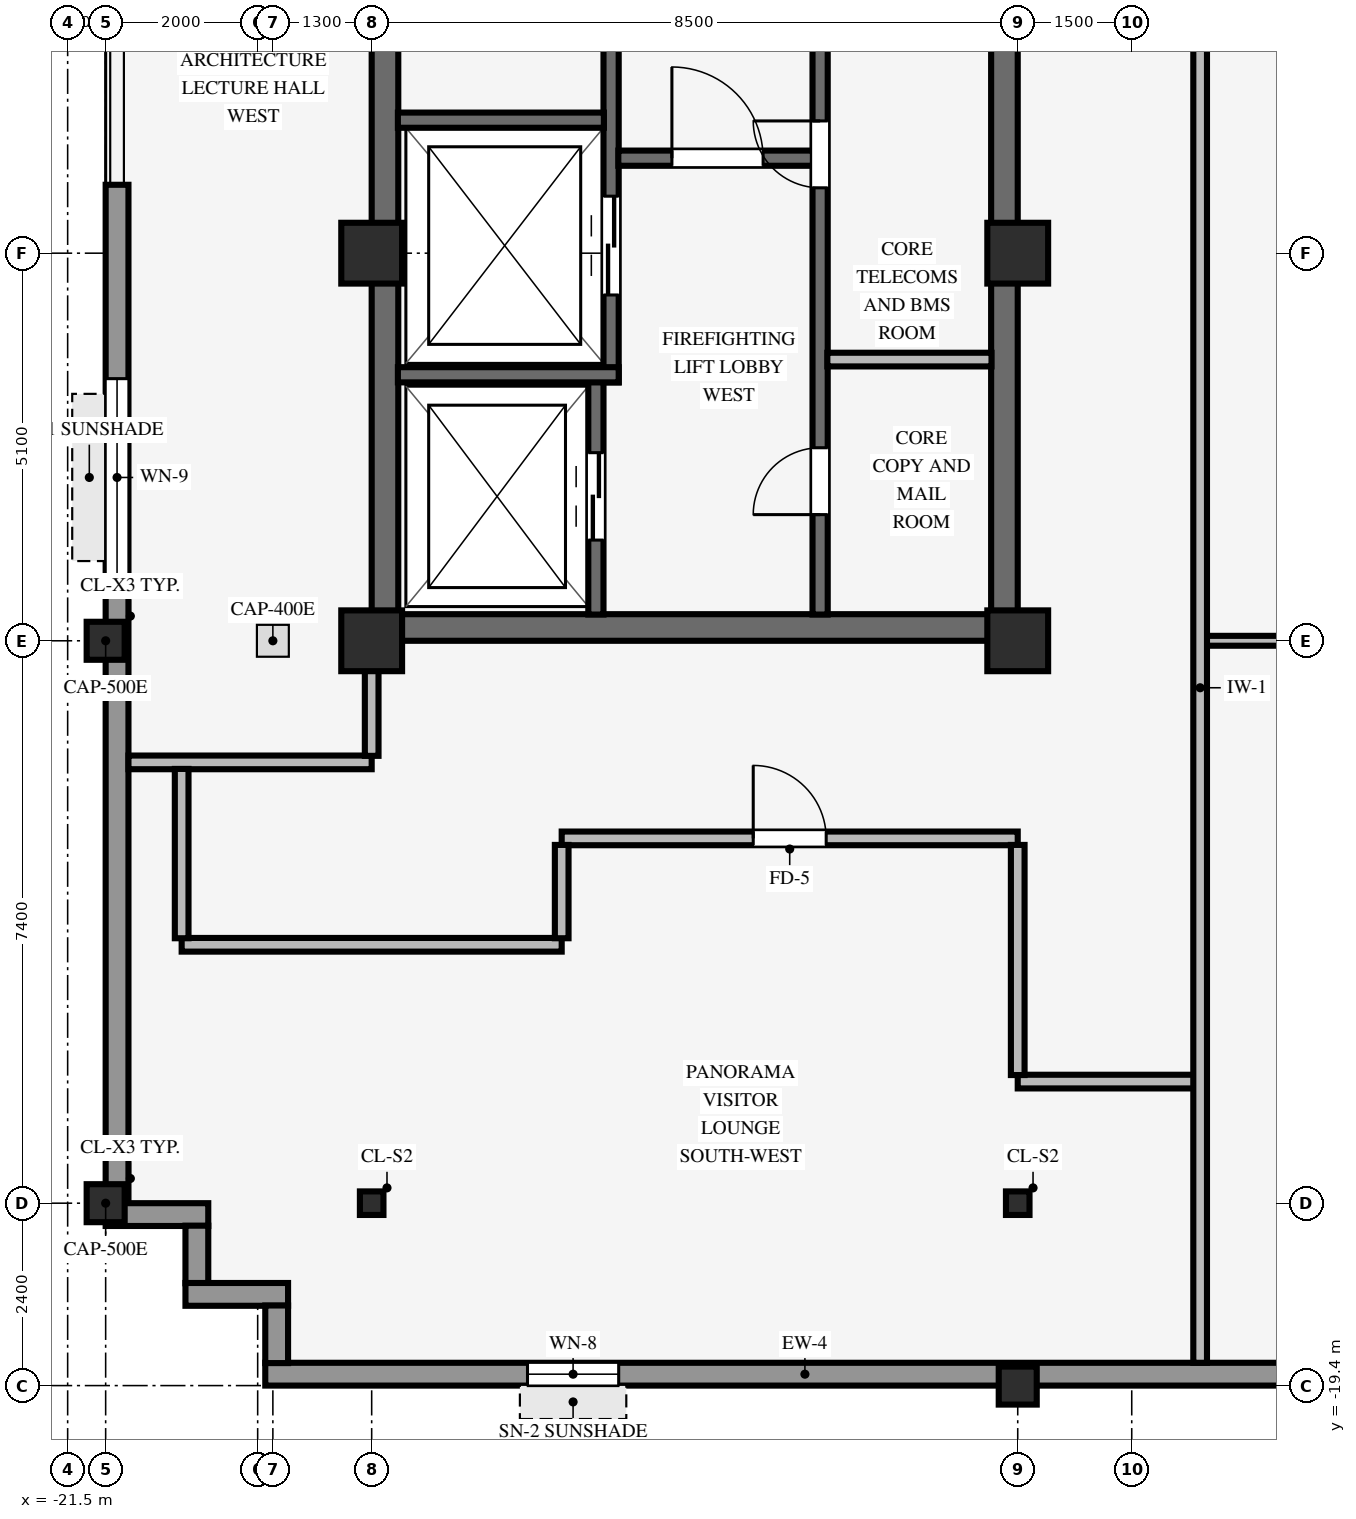
"""IFC4 building model, lengths in metres.
Left out: names, types, materials, properties, quantities, classifications, styles, units other than length and angle.
Written with IfcOpenShell. Run it as: python <this file> out.ifc"""

import sys

from ifc_helpers import new_model, si_unit, direction, frame, frame_2d, origin, origin_2d, place, context, subcontext, project, spatial, rectangle, hollow_rectangle, i_section, extrude, source, transform, mapped, element, fill, save


model = new_model("IFC4")
c1 = context("Model", 3, precision=1e-05, world=origin(), true_north=direction((0.0, 1.0)))
c2 = subcontext(c1, "Body", "Model", "MODEL_VIEW")
j1 = project(units=[si_unit("LENGTHUNIT", "METRE"), si_unit("PLANEANGLEUNIT", "RADIAN")], contexts=[c1])
p1 = place(None, origin())
s1 = spatial("IfcSite", under=j1, at=p1, CompositionType="ELEMENT")
p2 = place(p1, origin())
s2 = spatial("IfcBuilding", under=s1, at=p2, CompositionType="ELEMENT")
p3 = place(p2, frame((0.0, 0.0, 283.5)))
s3 = spatial("IfcBuildingStorey", under=s2, at=p3, CompositionType="ELEMENT", Elevation=283.5)
p4 = place(p3, frame((-17.5, -9.425, 0.0), z_axis=(0.0, 0.0, 1.0), x_axis=(1.0, 0.0, 0.0)))
e1 = element("IfcWall", 1, at=p4, inside=s3, PredefinedType="SHEAR", context=c2, shape_type="SweptSolid", body=[
    extrude(rectangle(XDim=8.5, YDim=0.35, at=frame_2d((4.25, 0.0))), origin(), (0.0, 0.0, 1.0), 3.25),
])
p5 = place(p3, frame((-17.325, -9.255, 0.0), z_axis=(0.0, 0.0, 1.0), x_axis=(0.0, 1.0, 0.0)))
e2 = element("IfcWall", 2, at=p5, inside=s3, PredefinedType="SHEAR", context=c2, shape_type="SweptSolid", body=[
    extrude(rectangle(XDim=18.51, YDim=0.35, at=frame_2d((9.255, 0.0))), origin(), (0.0, 0.0, 1.0), 3.25),
])
p6 = place(p3, frame((-9.175, -9.255, 0.0), z_axis=(0.0, 0.0, 1.0), x_axis=(0.0, 1.0, 0.0)))
e3 = element("IfcWall", 3, at=p6, inside=s3, PredefinedType="SHEAR", context=c2, shape_type="SweptSolid", body=[
    extrude(rectangle(XDim=18.51, YDim=0.35, at=frame_2d((9.255, 0.0))), origin(), (0.0, 0.0, 1.0), 3.25),
])
p7 = place(p6, frame((8.655, 0.0, 0.0)))
e4 = element("IfcOpeningElement", 4, at=p7, cuts=e3, PredefinedType="OPENING", context=c2, shape_type="SweptSolid", body=[
    extrude(rectangle(XDim=1.2, YDim=2.15, at=frame_2d((0.6, 1.075))), frame((0.0, 0.185, 0.0), z_axis=(0.0, -1.0, 0.0), x_axis=(1.0, 0.0, 0.0)), (0.0, 0.0, 1.0), 0.37),
])
for number, where, z_axis, x_axis in (
    (5, (-17.5, -9.6, 0.0), (0.0, 0.0, 1.0), (1.0, 0.0, 0.0)),
    (6, (-17.5, -4.5, 0.0), (0.0, 0.0, 1.0), (1.0, 0.0, 0.0)),
    (7, (-9.0, -9.6, 0.0), (0.0, 0.0, 1.0), (1.0, 0.0, 0.0)),
    (8, (-9.0, -4.5, 0.0), (0.0, 0.0, 1.0), (1.0, 0.0, 0.0)),
):
    element("IfcColumn", number, at=place(p3, frame(where, z_axis=z_axis, x_axis=x_axis)), inside=s3, PredefinedType="COLUMN", context=c2, shape_type="SweptSolid", body=[
        extrude(rectangle(XDim=0.8, YDim=0.8, at=origin_2d()), origin(), (0.0, 0.0, 1.0), 3.25),
    ])
for number, where, z_axis, x_axis in (
    (9, (-21.0, -17.0, 0.0), (0.0, 0.0, 1.0), (1.0, 0.0, 0.0)),
    (10, (-21.0, -9.6, 0.0), (0.0, 0.0, 1.0), (1.0, 0.0, 0.0)),
    (11, (-9.0, -19.4, 0.0), (0.0, 0.0, 1.0), (1.0, 0.0, 0.0)),
):
    element("IfcColumn", number, at=place(p3, frame(where, z_axis=z_axis, x_axis=x_axis)), inside=s3, PredefinedType="COLUMN", context=c2, shape_type="SweptSolid", body=[
        extrude(hollow_rectangle(XDim=0.5, YDim=0.5, WallThickness=0.032, InnerFilletRadius=0.032, OuterFilletRadius=0.064, at=origin_2d()), origin(), (0.0, 0.0, 1.0), 3.25),
    ])
for number, where, z_axis, x_axis in (
    (12, (-17.5, -17.0, 0.0), (0.0, 0.0, 1.0), (1.0, 0.0, 0.0)),
    (13, (-9.0, -17.0, 0.0), (0.0, 0.0, 1.0), (1.0, 0.0, 0.0)),
):
    element("IfcColumn", number, at=place(p3, frame(where, z_axis=z_axis, x_axis=x_axis)), inside=s3, PredefinedType="COLUMN", context=c2, shape_type="SweptSolid", body=[
        extrude(i_section(OverallWidth=0.31, OverallDepth=0.31, WebThickness=0.015, FlangeThickness=0.015, FilletRadius=0.015, at=origin_2d()), origin(), (0.0, 0.0, 1.0), 3.25),
    ])
p8 = place(p3, frame((-18.9, -19.25, 0.0), z_axis=(0.0, 0.0, 1.0), x_axis=(1.0, 0.0, 0.0)))
e14 = element("IfcWall", 14, at=p8, inside=s3, PredefinedType="STANDARD", context=c2, shape_type="SweptSolid", body=[
    extrude(rectangle(XDim=14.2, YDim=0.3, at=frame_2d((7.1, 0.0))), origin(), (0.0, 0.0, 1.0), 3.24),
])
p9 = place(p8, frame((3.45, 0.0, 0.8)))
e15 = element("IfcOpeningElement", 15, at=p9, cuts=e14, PredefinedType="OPENING", context=c2, shape_type="SweptSolid", body=[
    extrude(rectangle(XDim=1.2, YDim=1.48, at=frame_2d((0.6, 0.74))), frame((0.0, 0.16, 0.0), z_axis=(0.0, -1.0, 0.0), x_axis=(1.0, 0.0, 0.0)), (0.0, 0.0, 1.0), 0.32),
])
p10 = place(p3, frame((-20.85, -17.004, 0.0), z_axis=(0.0, 0.0, 1.0), x_axis=(0.0, 1.0, 0.0)))
e16 = element("IfcWall", 16, at=p10, inside=s3, PredefinedType="STANDARD", context=c2, shape_type="SweptSolid", body=[
    extrude(rectangle(XDim=13.404, YDim=0.3, at=frame_2d((6.702, 0.0))), origin(), (0.0, 0.0, 1.0), 3.24),
])
p11 = place(p10, frame((8.253, 0.0, 0.8)))
e17 = element("IfcOpeningElement", 17, at=p11, cuts=e16, PredefinedType="OPENING", context=c2, shape_type="SweptSolid", body=[
    extrude(rectangle(XDim=2.6, YDim=1.9, at=frame_2d((1.3, 0.95))), frame((0.0, 0.16, 0.0), z_axis=(0.0, -1.0, 0.0), x_axis=(1.0, 0.0, 0.0)), (0.0, 0.0, 1.0), 0.32),
])
p12 = place(p3, frame((-21.0, -17.15, 0.0), z_axis=(0.0, 0.0, 1.0), x_axis=(1.0, 0.0, 0.0)))
e18 = element("IfcWall", 18, at=p12, inside=s3, PredefinedType="STANDARD", context=c2, shape_type="SweptSolid", body=[
    extrude(rectangle(XDim=1.35, YDim=0.3, at=frame_2d((0.675, 0.0))), origin(), (0.0, 0.0, 1.0), 3.24),
])
p13 = place(p3, frame((-19.8, -18.054, 0.0), z_axis=(0.0, 0.0, 1.0), x_axis=(0.0, 1.0, 0.0)))
e19 = element("IfcWall", 19, at=p13, inside=s3, PredefinedType="STANDARD", context=c2, shape_type="SweptSolid", body=[
    extrude(rectangle(XDim=0.758, YDim=0.3, at=frame_2d((0.379, 0.0))), origin(), (0.0, 0.0, 1.0), 3.24),
])
p14 = place(p3, frame((-19.95, -18.2, 0.0), z_axis=(0.0, 0.0, 1.0), x_axis=(1.0, 0.0, 0.0)))
e20 = element("IfcWall", 20, at=p14, inside=s3, PredefinedType="STANDARD", context=c2, shape_type="SweptSolid", body=[
    extrude(rectangle(XDim=1.35, YDim=0.3, at=frame_2d((0.675, 0.0))), origin(), (0.0, 0.0, 1.0), 3.24),
])
p15 = place(p3, frame((-18.75, -19.104, 0.0), z_axis=(0.0, 0.0, 1.0), x_axis=(0.0, 1.0, 0.0)))
e21 = element("IfcWall", 21, at=p15, inside=s3, PredefinedType="STANDARD", context=c2, shape_type="SweptSolid", body=[
    extrude(rectangle(XDim=0.758, YDim=0.3, at=frame_2d((0.379, 0.0))), origin(), (0.0, 0.0, 1.0), 3.24),
])
p16 = place(p3, frame((-14.55, -9.255, 0.0), z_axis=(0.0, 0.0, 1.0), x_axis=(0.0, 1.0, 0.0)))
e22 = element("IfcWall", 22, at=p16, inside=s3, PredefinedType="SHEAR", context=c2, shape_type="SweptSolid", body=[
    extrude(rectangle(XDim=3.06, YDim=0.2, at=frame_2d((1.53, 0.0))), origin(), (0.0, 0.0, 1.0), 3.25),
])
p17 = place(p16, frame((0.98, 0.0, 0.0)))
e23 = element("IfcOpeningElement", 23, at=p17, cuts=e22, PredefinedType="OPENING", context=c2, shape_type="SweptSolid", body=[
    extrude(rectangle(XDim=1.15, YDim=2.15, at=frame_2d((0.575, 1.075))), frame((0.0, 0.11, 0.0), z_axis=(0.0, -1.0, 0.0), x_axis=(1.0, 0.0, 0.0)), (0.0, 0.0, 1.0), 0.22),
])
p18 = place(p3, frame((-14.35, -6.2, 0.0), z_axis=(0.0, 0.0, 1.0), x_axis=(0.0, 1.0, 0.0)))
e24 = element("IfcWall", 24, at=p18, inside=s3, PredefinedType="SHEAR", context=c2, shape_type="SweptSolid", body=[
    extrude(rectangle(XDim=7.105, YDim=0.2, at=frame_2d((3.552, 0.0))), origin(), (0.0, 0.0, 1.0), 3.25),
])
p19 = place(p18, frame((5.69, 0.0, 0.0), z_axis=(0.0, 0.0, 1.0), x_axis=(-1.0, 0.0, 0.0)))
e25 = element("IfcOpeningElement", 25, at=p19, cuts=e24, PredefinedType="OPENING", context=c2, shape_type="SweptSolid", body=[
    extrude(rectangle(XDim=0.88, YDim=2.1, at=frame_2d((0.44, 1.05))), frame((0.0, 0.11, 0.0), z_axis=(0.0, -1.0, 0.0), x_axis=(1.0, 0.0, 0.0)), (0.0, 0.0, 1.0), 0.22),
])
p20 = place(p18, frame((1.15, 0.0, 0.0)))
e26 = element("IfcOpeningElement", 26, at=p20, cuts=e24, PredefinedType="OPENING", context=c2, shape_type="SweptSolid", body=[
    extrude(rectangle(XDim=1.3, YDim=2.2, at=frame_2d((0.65, 1.1))), frame((0.0, 0.11, 0.0), z_axis=(0.0, -1.0, 0.0), x_axis=(1.0, 0.0, 0.0)), (0.0, 0.0, 1.0), 0.22),
])
p21 = place(p3, frame((-17.155, -6.1, 0.0), z_axis=(0.0, 0.0, 1.0), x_axis=(1.0, 0.0, 0.0)))
e27 = element("IfcWall", 27, at=p21, inside=s3, PredefinedType="SHEAR", context=c2, shape_type="SweptSolid", body=[
    extrude(rectangle(XDim=2.905, YDim=0.2, at=frame_2d((1.453, 0.0))), origin(), (0.0, 0.0, 1.0), 3.25),
])
p22 = place(p3, frame((-17.155, -2.75, 0.0), z_axis=(0.0, 0.0, 1.0), x_axis=(1.0, 0.0, 0.0)))
e28 = element("IfcWall", 28, at=p22, inside=s3, PredefinedType="SHEAR", context=c2, shape_type="SweptSolid", body=[
    extrude(rectangle(XDim=2.71, YDim=0.2, at=frame_2d((1.355, 0.0))), origin(), (0.0, 0.0, 1.0), 3.25),
])
p23 = place(p3, frame((-11.6, -9.255, 0.0), z_axis=(0.0, 0.0, 1.0), x_axis=(0.0, 1.0, 0.0)))
e29 = element("IfcWall", 29, at=p23, inside=s3, PredefinedType="SHEAR", context=c2, shape_type="SweptSolid", body=[
    extrude(rectangle(XDim=8.025, YDim=0.2, at=frame_2d((4.012, 0.0))), origin(), (0.0, 0.0, 1.0), 3.25),
])
p24 = place(p23, frame((1.315, 0.0, 0.0)))
e30 = element("IfcOpeningElement", 30, at=p24, cuts=e29, PredefinedType="OPENING", context=c2, shape_type="SweptSolid", body=[
    extrude(rectangle(XDim=0.88, YDim=2.1, at=frame_2d((0.44, 1.05))), frame((0.0, 0.11, 0.0), z_axis=(0.0, -1.0, 0.0), x_axis=(1.0, 0.0, 0.0)), (0.0, 0.0, 1.0), 0.22),
])
p25 = place(p23, frame((5.615, 0.0, 0.0)))
e31 = element("IfcOpeningElement", 31, at=p25, cuts=e29, PredefinedType="OPENING", context=c2, shape_type="SweptSolid", body=[
    extrude(rectangle(XDim=0.88, YDim=2.1, at=frame_2d((0.44, 1.05))), frame((0.0, 0.11, 0.0), z_axis=(0.0, -1.0, 0.0), x_axis=(1.0, 0.0, 0.0)), (0.0, 0.0, 1.0), 0.22),
])
p26 = place(p3, frame((-14.255, -3.25, 0.0), z_axis=(0.0, 0.0, 1.0), x_axis=(1.0, 0.0, 0.0)))
e32 = element("IfcWall", 32, at=p26, inside=s3, PredefinedType="SHEAR", context=c2, shape_type="SweptSolid", body=[
    extrude(rectangle(XDim=2.56, YDim=0.2, at=frame_2d((1.28, 0.0))), origin(), (0.0, 0.0, 1.0), 3.25),
])
p27 = place(p26, frame((0.705, 0.0, 0.0)))
e33 = element("IfcOpeningElement", 33, at=p27, cuts=e32, PredefinedType="OPENING", context=c2, shape_type="SweptSolid", body=[
    extrude(rectangle(XDim=1.2, YDim=2.15, at=frame_2d((0.6, 1.075))), frame((0.0, 0.11, 0.0), z_axis=(0.0, -1.0, 0.0), x_axis=(1.0, 0.0, 0.0)), (0.0, 0.0, 1.0), 0.22),
])
p28 = place(p3, frame((-11.505, -5.9, 0.0), z_axis=(0.0, 0.0, 1.0), x_axis=(1.0, 0.0, 0.0)))
e34 = element("IfcWall", 34, at=p28, inside=s3, PredefinedType="PARTITIONING", context=c2, shape_type="SweptSolid", body=[
    extrude(rectangle(XDim=2.16, YDim=0.18, at=frame_2d((1.08, 0.0))), origin(), (0.0, 0.0, 1.0), 3.24),
])
p29 = place(p3, frame((-9.0, -15.4, 0.0), z_axis=(0.0, 0.0, 1.0), x_axis=(1.0, 0.0, 0.0)))
e35 = element("IfcWall", 35, at=p29, inside=s3, PredefinedType="PARTITIONING", context=c2, shape_type="SweptSolid", body=[
    extrude(rectangle(XDim=2.339, YDim=0.18, at=frame_2d((1.169, 0.0))), origin(), (0.0, 0.0, 1.0), 3.24),
])
p30 = place(p3, frame((-20.0, -13.6, 0.0), z_axis=(0.0, 0.0, 1.0), x_axis=(1.0, 0.0, 0.0)))
e36 = element("IfcWall", 36, at=p30, inside=s3, PredefinedType="PARTITIONING", context=c2, shape_type="SweptSolid", body=[
    extrude(rectangle(XDim=5.0, YDim=0.18, at=frame_2d((2.5, 0.0))), origin(), (0.0, 0.0, 1.0), 3.24),
])
p31 = place(p3, frame((-15.0, -12.2, 0.0), z_axis=(0.0, 0.0, 1.0), x_axis=(1.0, 0.0, 0.0)))
e37 = element("IfcWall", 37, at=p31, inside=s3, PredefinedType="PARTITIONING", context=c2, shape_type="SweptSolid", body=[
    extrude(rectangle(XDim=6.0, YDim=0.18, at=frame_2d((3.0, 0.0))), origin(), (0.0, 0.0, 1.0), 3.24),
])
p32 = place(p31, frame((2.52, 0.0, 0.0)))
e38 = element("IfcOpeningElement", 38, at=p32, cuts=e37, PredefinedType="OPENING", context=c2, shape_type="SweptSolid", body=[
    extrude(rectangle(XDim=0.96, YDim=2.1, at=frame_2d((0.48, 1.05))), frame((0.0, 0.1, 0.0), z_axis=(0.0, -1.0, 0.0), x_axis=(1.0, 0.0, 0.0)), (0.0, 0.0, 1.0), 0.2),
])
p33 = place(p3, frame((-20.7, -11.2, 0.0), z_axis=(0.0, 0.0, 1.0), x_axis=(1.0, 0.0, 0.0)))
e39 = element("IfcWall", 39, at=p33, inside=s3, PredefinedType="PARTITIONING", context=c2, shape_type="SweptSolid", body=[
    extrude(rectangle(XDim=3.2, YDim=0.18, at=frame_2d((1.6, 0.0))), origin(), (0.0, 0.0, 1.0), 3.24),
])
p34 = place(p3, frame((-6.539, -9.6, 0.0), z_axis=(0.0, 0.0, 1.0), x_axis=(1.0, 0.0, 0.0)))
e40 = element("IfcWall", 40, at=p34, inside=s3, PredefinedType="PARTITIONING", context=c2, shape_type="SweptSolid", body=[
    extrude(rectangle(XDim=6.388, YDim=0.13, at=frame_2d((3.194, 0.0))), origin(), (0.0, 0.0, 1.0), 2.285),
])
p35 = place(p3, frame((-20.0, -13.514, 0.0), z_axis=(0.0, 0.0, 1.0), x_axis=(0.0, 1.0, 0.0)))
e41 = element("IfcWall", 41, at=p35, inside=s3, PredefinedType="PARTITIONING", context=c2, shape_type="SweptSolid", body=[
    extrude(rectangle(XDim=2.228, YDim=0.18, at=frame_2d((1.114, 0.0))), origin(), (0.0, 0.0, 1.0), 3.24),
])
p36 = place(p3, frame((-17.5, -11.114, 0.0), z_axis=(0.0, 0.0, 1.0), x_axis=(0.0, 1.0, 0.0)))
e42 = element("IfcWall", 42, at=p36, inside=s3, PredefinedType="PARTITIONING", context=c2, shape_type="SweptSolid", body=[
    extrude(rectangle(XDim=1.118, YDim=0.18, at=frame_2d((0.559, 0.0))), origin(), (0.0, 0.0, 1.0), 3.24),
])
p37 = place(p3, frame((-15.0, -13.514, 0.0), z_axis=(0.0, 0.0, 1.0), x_axis=(0.0, 1.0, 0.0)))
e43 = element("IfcWall", 43, at=p37, inside=s3, PredefinedType="PARTITIONING", context=c2, shape_type="SweptSolid", body=[
    extrude(rectangle(XDim=1.228, YDim=0.18, at=frame_2d((0.614, 0.0))), origin(), (0.0, 0.0, 1.0), 3.24),
])
p38 = place(p3, frame((-9.0, -15.314, 0.0), z_axis=(0.0, 0.0, 1.0), x_axis=(0.0, 1.0, 0.0)))
e44 = element("IfcWall", 44, at=p38, inside=s3, PredefinedType="PARTITIONING", context=c2, shape_type="SweptSolid", body=[
    extrude(rectangle(XDim=3.028, YDim=0.18, at=frame_2d((1.514, 0.0))), origin(), (0.0, 0.0, 1.0), 2.772),
])
p39 = place(p3, frame((-6.6, -19.1, 0.0), z_axis=(0.0, 0.0, 1.0), x_axis=(0.0, 1.0, 0.0)))
e45 = element("IfcWall", 45, at=p39, inside=s3, PredefinedType="PARTITIONING", context=c2, shape_type="SweptSolid", body=[
    extrude(rectangle(XDim=17.764, YDim=0.18, at=frame_2d((8.882, 0.0))), origin(), (0.0, 0.0, 1.0), 3.24),
])
m1 = source(origin(), c2, "Body", "SweptSolid", [
    extrude(rectangle(XDim=1.2, YDim=1.48, at=frame_2d((0.6, 0.74))), frame((0.0, 0.03, 0.0), z_axis=(0.0, -1.0, 0.0), x_axis=(1.0, 0.0, 0.0)), (0.0, 0.0, 1.0), 0.06),
])
p40 = place(p9, origin())
e46 = element("IfcWindow", 46, at=p40, inside=s3, PartitioningType="SINGLE_PANEL", PredefinedType="WINDOW", context=c2, shape_type="MappedRepresentation", body=[
    mapped(m1, transform((0.0, 0.0, 0.0), scale=1.0)),
])
fill(e15, e46)
m2 = source(origin(), c2, "Body", "SweptSolid", [
    extrude(rectangle(XDim=2.6, YDim=1.9, at=frame_2d((1.3, 0.95))), frame((0.0, 0.03, 0.0), z_axis=(0.0, -1.0, 0.0), x_axis=(1.0, 0.0, 0.0)), (0.0, 0.0, 1.0), 0.06),
])
p41 = place(p11, origin())
e47 = element("IfcWindow", 47, at=p41, inside=s3, PartitioningType="SINGLE_PANEL", PredefinedType="WINDOW", context=c2, shape_type="MappedRepresentation", body=[
    mapped(m2, transform((0.0, 0.0, 0.0), scale=1.0)),
])
fill(e17, e47)
m3 = source(origin(), c2, "Body", "SweptSolid", [
    extrude(rectangle(XDim=1.2, YDim=2.15, at=frame_2d((0.6, 1.075))), frame((0.0, 0.025, 0.0), z_axis=(0.0, -1.0, 0.0), x_axis=(1.0, 0.0, 0.0)), (0.0, 0.0, 1.0), 0.05),
])
p42 = place(p27, origin())
e48 = element("IfcDoor", 48, at=p42, inside=s3, OperationType="SINGLE_SWING_LEFT", PredefinedType="DOOR", context=c2, shape_type="MappedRepresentation", body=[
    mapped(m3, transform((0.0, 0.0, 0.0), scale=1.0)),
])
fill(e33, e48)
m4 = source(origin(), c2, "Body", "SweptSolid", [
    extrude(rectangle(XDim=0.88, YDim=2.1, at=frame_2d((0.44, 1.05))), frame((0.0, 0.025, 0.0), z_axis=(0.0, -1.0, 0.0), x_axis=(1.0, 0.0, 0.0)), (0.0, 0.0, 1.0), 0.05),
])
p43 = place(p24, origin())
e49 = element("IfcDoor", 49, at=p43, inside=s3, OperationType="SINGLE_SWING_LEFT", PredefinedType="DOOR", context=c2, shape_type="MappedRepresentation", body=[
    mapped(m4, transform((0.0, 0.0, 0.0), scale=1.0)),
])
fill(e30, e49)
p44 = place(p25, origin())
e50 = element("IfcDoor", 50, at=p44, inside=s3, OperationType="SINGLE_SWING_RIGHT", PredefinedType="DOOR", context=c2, shape_type="MappedRepresentation", body=[
    mapped(m4, transform((0.0, 0.0, 0.0), scale=1.0)),
])
fill(e31, e50)
m5 = source(origin(), c2, "Body", "SweptSolid", [
    extrude(rectangle(XDim=1.15, YDim=2.15, at=frame_2d((0.575, 1.075))), frame((0.0, 0.025, 0.0), z_axis=(0.0, -1.0, 0.0), x_axis=(1.0, 0.0, 0.0)), (0.0, 0.0, 1.0), 0.05),
])
p45 = place(p17, origin())
e51 = element("IfcDoor", 51, at=p45, inside=s3, OperationType="DOUBLE_DOOR_SLIDING", PredefinedType="DOOR", context=c2, shape_type="MappedRepresentation", body=[
    mapped(m5, transform((0.0, 0.0, 0.0), scale=1.0)),
])
fill(e23, e51)
m6 = source(origin(), c2, "Body", "SweptSolid", [
    extrude(rectangle(XDim=1.3, YDim=2.2, at=frame_2d((0.65, 1.1))), frame((0.0, 0.025, 0.0), z_axis=(0.0, -1.0, 0.0), x_axis=(1.0, 0.0, 0.0)), (0.0, 0.0, 1.0), 0.05),
])
p46 = place(p20, origin())
e52 = element("IfcDoor", 52, at=p46, inside=s3, OperationType="DOUBLE_DOOR_SLIDING", PredefinedType="DOOR", context=c2, shape_type="MappedRepresentation", body=[
    mapped(m6, transform((0.0, 0.0, 0.0), scale=1.0)),
])
fill(e26, e52)
m7 = source(origin(), c2, "Body", "SweptSolid", [
    extrude(rectangle(XDim=0.96, YDim=2.1, at=frame_2d((0.48, 1.05))), frame((0.0, 0.025, 0.0), z_axis=(0.0, -1.0, 0.0), x_axis=(1.0, 0.0, 0.0)), (0.0, 0.0, 1.0), 0.05),
])
p47 = place(p32, origin())
e53 = element("IfcDoor", 53, at=p47, inside=s3, OperationType="SINGLE_SWING_LEFT", PredefinedType="DOOR", context=c2, shape_type="MappedRepresentation", body=[
    mapped(m7, transform((0.0, 0.0, 0.0), scale=1.0)),
])
fill(e38, e53)
save(model, sys.argv[1])
